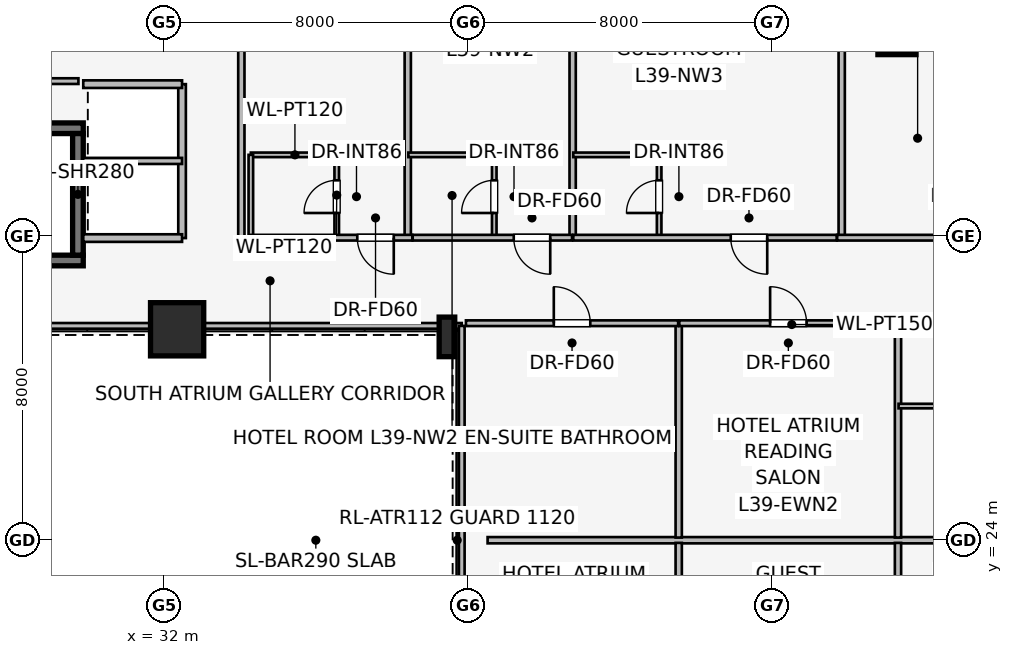
"""IFC4 building model, lengths in metres.
Left out: names, types, materials, properties, quantities, classifications, styles, units other than length and angle.
Written with IfcOpenShell. Run it as: python <this file> out.ifc"""

import sys

from ifc_helpers import new_model, si_unit, direction, frame, frame_2d, origin, origin_2d, place, context, subcontext, project, spatial, rectangle, i_section, extrude, element, fill, save


model = new_model("IFC4")
c1 = context("Model", 3, precision=1e-05, world=origin(), true_north=direction((0.0, 1.0)))
c2 = subcontext(c1, "Body", "Model", "MODEL_VIEW")
j1 = project(units=[si_unit("LENGTHUNIT", "METRE"), si_unit("PLANEANGLEUNIT", "RADIAN")], contexts=[c1])
p1 = place(None, origin())
s1 = spatial("IfcSite", under=j1, at=p1, CompositionType="ELEMENT")
p2 = place(p1, origin())
s2 = spatial("IfcBuilding", under=s1, at=p2, CompositionType="ELEMENT")
p3 = place(p2, frame((0.0, 0.0, 146.4)))
s3 = spatial("IfcBuildingStorey", under=s2, at=p3, CompositionType="ELEMENT", Elevation=146.4)
p4 = place(p3, frame((21.52, 31.36, 0.0), z_axis=(0.0, 0.0, 1.0), x_axis=(1.0, 0.0, 0.0)))
e1 = element("IfcWall", 1, at=p4, inside=s3, PredefinedType="SHEAR", context=c2, shape_type="SweptSolid", body=[
    extrude(rectangle(XDim=8.36, YDim=0.28, at=frame_2d((4.18, 0.0))), origin(), (0.0, 0.0, 1.0), 3.45),
])
p5 = place(p4, frame((0.45, 0.0, 0.0)))
e2 = element("IfcOpeningElement", 2, at=p5, cuts=e1, PredefinedType="OPENING", context=c2, shape_type="SweptSolid", body=[
    extrude(rectangle(XDim=1.05, YDim=2.0, at=frame_2d((0.525, 1.0))), frame((0.0, 0.15, 0.0), z_axis=(0.0, -1.0, 0.0), x_axis=(1.0, 0.0, 0.0)), (0.0, 0.0, 1.0), 0.3),
])
p6 = place(p3, frame((29.88, 34.84, 0.0), z_axis=(0.0, 0.0, 1.0), x_axis=(-1.0, 0.0, 0.0)))
e3 = element("IfcWall", 3, at=p6, inside=s3, PredefinedType="SHEAR", context=c2, shape_type="SweptSolid", body=[
    extrude(rectangle(XDim=8.36, YDim=0.28, at=frame_2d((4.18, 0.0))), origin(), (0.0, 0.0, 1.0), 3.45),
])
p7 = place(p3, frame((29.74, 31.5, 0.0), z_axis=(0.0, 0.0, 1.0), x_axis=(0.0, 1.0, 0.0)))
e4 = element("IfcWall", 4, at=p7, inside=s3, PredefinedType="SHEAR", context=c2, shape_type="SweptSolid", body=[
    extrude(rectangle(XDim=3.2, YDim=0.28, at=frame_2d((1.6, 0.0))), origin(), (0.0, 0.0, 1.0), 3.45),
])
p8 = place(p3, frame((32.35, 29.55, 0.0), z_axis=(0.0, 0.0, 1.0), x_axis=(1.0, 0.0, 0.0)))
e5 = element("IfcColumn", 5, at=p8, inside=s3, PredefinedType="COLUMN", context=c2, shape_type="SweptSolid", body=[
    extrude(rectangle(XDim=1.4, YDim=1.4, at=origin_2d()), origin(), (0.0, 0.0, 1.0), 3.45),
])
p9 = place(p3, frame((51.291, 37.277, 0.0), z_axis=(0.0, 0.0, 1.0), x_axis=(1.0, 0.0, 0.0)))
e6 = element("IfcColumn", 6, at=p9, inside=s3, PredefinedType="COLUMN", context=c2, shape_type="SweptSolid", body=[
    extrude(rectangle(XDim=1.0, YDim=1.0, at=origin_2d()), origin(), (0.0, 0.0, 1.0), 3.45),
])
p10 = place(p3, frame((39.45, 29.35, 0.0), z_axis=(0.0, 0.0, 1.0), x_axis=(1.0, 0.0, 0.0)))
e7 = element("IfcColumn", 7, at=p10, inside=s3, PredefinedType="COLUMN", context=c2, shape_type="SweptSolid", body=[
    extrude(i_section(OverallWidth=0.41, OverallDepth=1.041, WebThickness=0.031, FlangeThickness=0.056, at=origin_2d()), origin(), (0.0, 0.0, 1.0), 3.45),
])
p11 = place(p3, frame((38.231, 44.558, 0.0), z_axis=(0.0, 0.0, 1.0), x_axis=(0.888613612362, -0.458656568606, 0.0)))
e8 = element("IfcWall", 8, at=p11, inside=s3, PredefinedType="STANDARD", context=c2, shape_type="SweptSolid", body=[
    extrude(rectangle(XDim=18.681, YDim=0.34, at=frame_2d((9.34, 0.0))), origin(), (0.0, 0.0, 1.0), 3.19),
])
p12 = place(p11, frame((1.066, 0.0, 0.75)))
e9 = element("IfcOpeningElement", 9, at=p12, cuts=e8, PredefinedType="OPENING", context=c2, shape_type="SweptSolid", body=[
    extrude(rectangle(XDim=1.6, YDim=1.55, at=frame_2d((0.8, 0.775))), frame((0.0, 0.18, 0.0), z_axis=(0.0, -1.0, 0.0), x_axis=(1.0, 0.0, 0.0)), (0.0, 0.0, 1.0), 0.36),
])
p13 = place(p11, frame((6.28, 0.0, 0.75)))
e10 = element("IfcOpeningElement", 10, at=p13, cuts=e8, PredefinedType="OPENING", context=c2, shape_type="SweptSolid", body=[
    extrude(rectangle(XDim=2.1, YDim=1.5, at=frame_2d((1.05, 0.75))), frame((0.0, 0.18, 0.0), z_axis=(0.0, -1.0, 0.0), x_axis=(1.0, 0.0, 0.0)), (0.0, 0.0, 1.0), 0.36),
])
p14 = place(p11, frame((9.901, 0.0, 0.75)))
e11 = element("IfcOpeningElement", 11, at=p14, cuts=e8, PredefinedType="OPENING", context=c2, shape_type="SweptSolid", body=[
    extrude(rectangle(XDim=2.1, YDim=1.5, at=frame_2d((1.05, 0.75))), frame((0.0, 0.18, 0.0), z_axis=(0.0, -1.0, 0.0), x_axis=(1.0, 0.0, 0.0)), (0.0, 0.0, 1.0), 0.36),
])
p15 = place(p11, frame((16.058, 0.0, 0.75)))
e12 = element("IfcOpeningElement", 12, at=p15, cuts=e8, PredefinedType="OPENING", context=c2, shape_type="SweptSolid", body=[
    extrude(rectangle(XDim=1.6, YDim=1.55, at=frame_2d((0.8, 0.775))), frame((0.0, 0.18, 0.0), z_axis=(0.0, -1.0, 0.0), x_axis=(1.0, 0.0, 0.0)), (0.0, 0.0, 1.0), 0.36),
])
p16 = place(p3, frame((32.48, 31.95, 0.0), z_axis=(0.0, 0.0, 1.0), x_axis=(0.0, 1.0, 0.0)))
e13 = element("IfcWall", 13, at=p16, inside=s3, PredefinedType="PARTITIONING", context=c2, shape_type="SweptSolid", body=[
    extrude(rectangle(XDim=4.05, YDim=0.2, at=frame_2d((2.025, 0.0))), origin(), (0.0, 0.0, 1.0), 3.19),
])
p17 = place(p3, frame((29.88, 36.0, 0.0), z_axis=(0.0, 0.0, 1.0), x_axis=(1.0, 0.0, 0.0)))
e14 = element("IfcWall", 14, at=p17, inside=s3, PredefinedType="PARTITIONING", context=c2, shape_type="SweptSolid", body=[
    extrude(rectangle(XDim=2.6, YDim=0.2, at=frame_2d((1.3, 0.0))), origin(), (0.0, 0.0, 1.0), 2.582),
])
p18 = place(p3, frame((32.48, 31.95, 0.0), z_axis=(0.0, 0.0, 1.0), x_axis=(-1.0, 0.0, 0.0)))
e15 = element("IfcWall", 15, at=p18, inside=s3, PredefinedType="PARTITIONING", context=c2, shape_type="SweptSolid", body=[
    extrude(rectangle(XDim=2.6, YDim=0.2, at=frame_2d((1.3, 0.0))), origin(), (0.0, 0.0, 1.0), 3.19),
])
p19 = place(p3, frame((29.875, 33.98, 0.0), z_axis=(0.0, 0.0, 1.0), x_axis=(1.0, 0.0, 0.0)))
e16 = element("IfcWall", 16, at=p19, inside=s3, PredefinedType="PARTITIONING", context=c2, shape_type="SweptSolid", body=[
    extrude(rectangle(XDim=2.605, YDim=0.16, at=frame_2d((1.302, 0.0))), origin(), (0.0, 0.0, 1.0), 3.19),
])
p20 = place(p3, frame((39.84, 29.64, 0.0), z_axis=(0.0, 0.0, 1.0), x_axis=(-1.0, 0.0, 0.0)))
e17 = element("IfcWall", 17, at=p20, inside=s3, PredefinedType="PARTITIONING", context=c2, shape_type="SweptSolid", body=[
    extrude(rectangle(XDim=12.2, YDim=0.15, at=frame_2d((6.1, 0.0))), origin(), (0.0, 0.0, 1.0), 2.331),
])
p21 = place(p3, frame((39.84, 18.36, 0.0), z_axis=(0.0, 0.0, 1.0), x_axis=(0.0, 1.0, 0.0)))
e18 = element("IfcWall", 18, at=p21, inside=s3, PredefinedType="PARTITIONING", context=c2, shape_type="SweptSolid", body=[
    extrude(rectangle(XDim=11.28, YDim=0.15, at=frame_2d((5.64, 0.0))), origin(), (0.0, 0.0, 1.0), 3.19),
])
p22 = place(p3, frame((34.04, 31.96, 0.0), z_axis=(0.0, 0.0, 1.0), x_axis=(0.0, 1.0, 0.0)))
e19 = element("IfcWall", 19, at=p22, inside=s3, PredefinedType="PARTITIONING", context=c2, shape_type="SweptSolid", body=[
    extrude(rectangle(XDim=12.558, YDim=0.165, at=frame_2d((6.279, 0.0))), origin(), (0.0, 0.0, 1.0), 3.19),
])
p23 = place(p3, frame((38.419, 31.97, 0.0), z_axis=(0.0, 0.0, 1.0), x_axis=(0.0, 1.0, 0.0)))
e20 = element("IfcWall", 20, at=p23, inside=s3, PredefinedType="PARTITIONING", context=c2, shape_type="SweptSolid", body=[
    extrude(rectangle(XDim=12.356, YDim=0.165, at=frame_2d((6.178, 0.0))), origin(), (0.0, 0.0, 1.0), 3.19),
])
p24 = place(p3, frame((42.758, 31.97, 0.0), z_axis=(0.0, 0.0, 1.0), x_axis=(0.0, 1.0, 0.0)))
e21 = element("IfcWall", 21, at=p24, inside=s3, PredefinedType="PARTITIONING", context=c2, shape_type="SweptSolid", body=[
    extrude(rectangle(XDim=10.116, YDim=0.165, at=frame_2d((5.058, 0.0))), origin(), (0.0, 0.0, 1.0), 3.19),
])
p25 = place(p3, frame((49.838, 31.97, 0.0), z_axis=(0.0, 0.0, 1.0), x_axis=(0.0, 1.0, 0.0)))
e22 = element("IfcWall", 22, at=p25, inside=s3, PredefinedType="PARTITIONING", context=c2, shape_type="SweptSolid", body=[
    extrude(rectangle(XDim=6.462, YDim=0.165, at=frame_2d((3.231, 0.0))), origin(), (0.0, 0.0, 1.0), 3.19),
])
p26 = place(p3, frame((36.55, 31.96, 0.0), z_axis=(0.0, 0.0, 1.0), x_axis=(0.0, 1.0, 0.0)))
e23 = element("IfcWall", 23, at=p26, inside=s3, PredefinedType="PARTITIONING", context=c2, shape_type="SweptSolid", body=[
    extrude(rectangle(XDim=2.24, YDim=0.12, at=frame_2d((1.12, 0.0))), origin(), (0.0, 0.0, 1.0), 3.19),
])
p27 = place(p26, frame((0.65, 0.0, 0.0)))
e24 = element("IfcOpeningElement", 24, at=p27, cuts=e23, PredefinedType="OPENING", context=c2, shape_type="SweptSolid", body=[
    extrude(rectangle(XDim=0.86, YDim=2.0, at=frame_2d((0.43, 1.0))), frame((0.0, 0.07, 0.0), z_axis=(0.0, -1.0, 0.0), x_axis=(1.0, 0.0, 0.0)), (0.0, 0.0, 1.0), 0.14),
])
p28 = place(p3, frame((36.61, 34.14, 0.0), z_axis=(0.0, 0.0, 1.0), x_axis=(-1.0, 0.0, 0.0)))
e25 = element("IfcWall", 25, at=p28, inside=s3, PredefinedType="PARTITIONING", context=c2, shape_type="SweptSolid", body=[
    extrude(rectangle(XDim=2.32, YDim=0.12, at=frame_2d((1.16, 0.0))), origin(), (0.0, 0.0, 1.0), 3.19),
])
p29 = place(p3, frame((34.29, 34.14, 0.0), z_axis=(0.0, 0.0, 1.0), x_axis=(0.0, -1.0, 0.0)))
e26 = element("IfcWall", 26, at=p29, inside=s3, PredefinedType="PARTITIONING", context=c2, shape_type="SweptSolid", body=[
    extrude(rectangle(XDim=2.14, YDim=0.12, at=frame_2d((1.07, 0.0))), origin(), (0.0, 0.0, 1.0), 3.19),
])
p30 = place(p3, frame((38.539, 31.96, 0.0), z_axis=(0.0, 0.0, 1.0), x_axis=(-1.0, 0.0, 0.0)))
e27 = element("IfcWall", 27, at=p30, inside=s3, PredefinedType="PARTITIONING", context=c2, shape_type="SweptSolid", body=[
    extrude(rectangle(XDim=4.249, YDim=0.15, at=frame_2d((2.125, 0.0))), origin(), (0.0, 0.0, 1.0), 3.19),
])
p31 = place(p30, frame((0.488, 0.0, 0.0)))
e28 = element("IfcOpeningElement", 28, at=p31, cuts=e27, PredefinedType="OPENING", context=c2, shape_type="SweptSolid", body=[
    extrude(rectangle(XDim=0.96, YDim=2.0, at=frame_2d((0.48, 1.0))), frame((0.0, 0.085, 0.0), z_axis=(0.0, -1.0, 0.0), x_axis=(1.0, 0.0, 0.0)), (0.0, 0.0, 1.0), 0.17),
])
p32 = place(p3, frame((40.695, 31.96, 0.0), z_axis=(0.0, 0.0, 1.0), x_axis=(0.0, 1.0, 0.0)))
e29 = element("IfcWall", 29, at=p32, inside=s3, PredefinedType="PARTITIONING", context=c2, shape_type="SweptSolid", body=[
    extrude(rectangle(XDim=2.24, YDim=0.12, at=frame_2d((1.12, 0.0))), origin(), (0.0, 0.0, 1.0), 3.19),
])
p33 = place(p32, frame((0.65, 0.0, 0.0)))
e30 = element("IfcOpeningElement", 30, at=p33, cuts=e29, PredefinedType="OPENING", context=c2, shape_type="SweptSolid", body=[
    extrude(rectangle(XDim=0.86, YDim=2.0, at=frame_2d((0.43, 1.0))), frame((0.0, 0.07, 0.0), z_axis=(0.0, -1.0, 0.0), x_axis=(1.0, 0.0, 0.0)), (0.0, 0.0, 1.0), 0.14),
])
p34 = place(p3, frame((40.755, 34.14, 0.0), z_axis=(0.0, 0.0, 1.0), x_axis=(-1.0, 0.0, 0.0)))
e31 = element("IfcWall", 31, at=p34, inside=s3, PredefinedType="PARTITIONING", context=c2, shape_type="SweptSolid", body=[
    extrude(rectangle(XDim=2.32, YDim=0.12, at=frame_2d((1.16, 0.0))), origin(), (0.0, 0.0, 1.0), 3.19),
])
p35 = place(p3, frame((42.742, 31.96, 0.0), z_axis=(0.0, 0.0, 1.0), x_axis=(-1.0, 0.0, 0.0)))
e32 = element("IfcWall", 32, at=p35, inside=s3, PredefinedType="PARTITIONING", context=c2, shape_type="SweptSolid", body=[
    extrude(rectangle(XDim=4.193, YDim=0.15, at=frame_2d((2.096, 0.0))), origin(), (0.0, 0.0, 1.0), 3.19),
])
p36 = place(p35, frame((0.574, 0.0, 0.0)))
e33 = element("IfcOpeningElement", 33, at=p36, cuts=e32, PredefinedType="OPENING", context=c2, shape_type="SweptSolid", body=[
    extrude(rectangle(XDim=0.96, YDim=2.0, at=frame_2d((0.48, 1.0))), frame((0.0, 0.085, 0.0), z_axis=(0.0, -1.0, 0.0), x_axis=(1.0, 0.0, 0.0)), (0.0, 0.0, 1.0), 0.17),
])
p37 = place(p3, frame((45.034, 31.96, 0.0), z_axis=(0.0, 0.0, 1.0), x_axis=(0.0, 1.0, 0.0)))
e34 = element("IfcWall", 34, at=p37, inside=s3, PredefinedType="PARTITIONING", context=c2, shape_type="SweptSolid", body=[
    extrude(rectangle(XDim=2.24, YDim=0.12, at=frame_2d((1.12, 0.0))), origin(), (0.0, 0.0, 1.0), 3.19),
])
p38 = place(p37, frame((0.65, 0.0, 0.0)))
e35 = element("IfcOpeningElement", 35, at=p38, cuts=e34, PredefinedType="OPENING", context=c2, shape_type="SweptSolid", body=[
    extrude(rectangle(XDim=0.86, YDim=2.0, at=frame_2d((0.43, 1.0))), frame((0.0, 0.07, 0.0), z_axis=(0.0, -1.0, 0.0), x_axis=(1.0, 0.0, 0.0)), (0.0, 0.0, 1.0), 0.14),
])
p39 = place(p3, frame((45.094, 34.14, 0.0), z_axis=(0.0, 0.0, 1.0), x_axis=(-1.0, 0.0, 0.0)))
e36 = element("IfcWall", 36, at=p39, inside=s3, PredefinedType="PARTITIONING", context=c2, shape_type="SweptSolid", body=[
    extrude(rectangle(XDim=2.32, YDim=0.12, at=frame_2d((1.16, 0.0))), origin(), (0.0, 0.0, 1.0), 3.19),
])
p40 = place(p3, frame((49.708, 31.96, 0.0), z_axis=(0.0, 0.0, 1.0), x_axis=(-1.0, 0.0, 0.0)))
e37 = element("IfcWall", 37, at=p40, inside=s3, PredefinedType="PARTITIONING", context=c2, shape_type="SweptSolid", body=[
    extrude(rectangle(XDim=6.934, YDim=0.15, at=frame_2d((3.467, 0.0))), origin(), (0.0, 0.0, 1.0), 3.19),
])
p41 = place(p40, frame((1.83, 0.0, 0.0)))
e38 = element("IfcOpeningElement", 38, at=p41, cuts=e37, PredefinedType="OPENING", context=c2, shape_type="SweptSolid", body=[
    extrude(rectangle(XDim=0.96, YDim=2.0, at=frame_2d((0.48, 1.0))), frame((0.0, 0.085, 0.0), z_axis=(0.0, -1.0, 0.0), x_axis=(1.0, 0.0, 0.0)), (0.0, 0.0, 1.0), 0.17),
])
p42 = place(p3, frame((56.987, 31.96, 0.0), z_axis=(0.0, 0.0, 1.0), x_axis=(-1.0, 0.0, 0.0)))
e39 = element("IfcWall", 39, at=p42, inside=s3, PredefinedType="PARTITIONING", context=c2, shape_type="SweptSolid", body=[
    extrude(rectangle(XDim=7.269, YDim=0.15, at=frame_2d((3.635, 0.0))), origin(), (0.0, 0.0, 1.0), 3.19),
])
p43 = place(p42, frame((3.212, 0.0, 0.0)))
e40 = element("IfcOpeningElement", 40, at=p43, cuts=e39, PredefinedType="OPENING", context=c2, shape_type="SweptSolid", body=[
    extrude(rectangle(XDim=0.96, YDim=2.0, at=frame_2d((0.48, 1.0))), frame((0.0, 0.085, 0.0), z_axis=(0.0, -1.0, 0.0), x_axis=(1.0, 0.0, 0.0)), (0.0, 0.0, 1.0), 0.17),
])
p44 = place(p3, frame((40.52, 24.0, 0.0), z_axis=(0.0, 0.0, 1.0), x_axis=(1.0, 0.0, 0.0)))
e41 = element("IfcWall", 41, at=p44, inside=s3, PredefinedType="PARTITIONING", context=c2, shape_type="SweptSolid", body=[
    extrude(rectangle(XDim=16.408, YDim=0.165, at=frame_2d((8.204, 0.0))), origin(), (0.0, 0.0, 1.0), 3.19),
])
for number, where, z_axis, x_axis in (
    (42, (45.549, 24.07, 0.0), (0.0, 0.0, 1.0), (0.0, 1.0, 0.0)),
    (43, (51.319, 24.07, 0.0), (0.0, 0.0, 1.0), (0.0, 1.0, 0.0)),
):
    element("IfcWall", number, at=place(p3, frame(where, z_axis=z_axis, x_axis=x_axis)), inside=s3, PredefinedType="PARTITIONING", context=c2, shape_type="SweptSolid", body=[
        extrude(rectangle(XDim=5.64, YDim=0.165, at=frame_2d((2.82, 0.0))), origin(), (0.0, 0.0, 1.0), 3.19),
    ])
p45 = place(p3, frame((39.95, 29.71, 0.0), z_axis=(0.0, 0.0, 1.0), x_axis=(1.0, 0.0, 0.0)))
e44 = element("IfcWall", 44, at=p45, inside=s3, PredefinedType="PARTITIONING", context=c2, shape_type="SweptSolid", body=[
    extrude(rectangle(XDim=5.584, YDim=0.15, at=frame_2d((2.792, 0.0))), origin(), (0.0, 0.0, 1.0), 3.19),
])
p46 = place(p45, frame((2.312, 0.0, 0.0)))
e45 = element("IfcOpeningElement", 45, at=p46, cuts=e44, PredefinedType="OPENING", context=c2, shape_type="SweptSolid", body=[
    extrude(rectangle(XDim=0.96, YDim=2.0, at=frame_2d((0.48, 1.0))), frame((0.0, 0.085, 0.0), z_axis=(0.0, -1.0, 0.0), x_axis=(1.0, 0.0, 0.0)), (0.0, 0.0, 1.0), 0.17),
])
p47 = place(p3, frame((45.564, 29.71, 0.0), z_axis=(0.0, 0.0, 1.0), x_axis=(1.0, 0.0, 0.0)))
e46 = element("IfcWall", 46, at=p47, inside=s3, PredefinedType="PARTITIONING", context=c2, shape_type="SweptSolid", body=[
    extrude(rectangle(XDim=5.74, YDim=0.15, at=frame_2d((2.87, 0.0))), origin(), (0.0, 0.0, 1.0), 3.19),
])
p48 = place(p47, frame((2.39, 0.0, 0.0)))
e47 = element("IfcOpeningElement", 47, at=p48, cuts=e46, PredefinedType="OPENING", context=c2, shape_type="SweptSolid", body=[
    extrude(rectangle(XDim=0.96, YDim=2.0, at=frame_2d((0.48, 1.0))), frame((0.0, 0.085, 0.0), z_axis=(0.0, -1.0, 0.0), x_axis=(1.0, 0.0, 0.0)), (0.0, 0.0, 1.0), 0.17),
])
p49 = place(p3, frame((51.334, 27.53, 0.0), z_axis=(0.0, 0.0, 1.0), x_axis=(1.0, 0.0, 0.0)))
e48 = element("IfcWall", 48, at=p49, inside=s3, PredefinedType="PARTITIONING", context=c2, shape_type="SweptSolid", body=[
    extrude(rectangle(XDim=2.32, YDim=0.12, at=frame_2d((1.16, 0.0))), origin(), (0.0, 0.0, 1.0), 3.19),
])
p50 = place(p3, frame((51.334, 29.71, 0.0), z_axis=(0.0, 0.0, 1.0), x_axis=(1.0, 0.0, 0.0)))
e49 = element("IfcWall", 49, at=p50, inside=s3, PredefinedType="PARTITIONING", context=c2, shape_type="SweptSolid", body=[
    extrude(rectangle(XDim=5.874, YDim=0.15, at=frame_2d((2.937, 0.0))), origin(), (0.0, 0.0, 1.0), 3.19),
])
p51 = place(p50, frame((3.572, 0.0, 0.0)))
e50 = element("IfcOpeningElement", 50, at=p51, cuts=e49, PredefinedType="OPENING", context=c2, shape_type="SweptSolid", body=[
    extrude(rectangle(XDim=0.96, YDim=2.0, at=frame_2d((0.48, 1.0))), frame((0.0, 0.085, 0.0), z_axis=(0.0, -1.0, 0.0), x_axis=(1.0, 0.0, 0.0)), (0.0, 0.0, 1.0), 0.17),
])
for number, where, z_axis, x_axis in (
    (51, (45.549, 18.29, 0.0), (0.0, 0.0, 1.0), (0.0, 1.0, 0.0)),
    (52, (51.319, 18.29, 0.0), (0.0, 0.0, 1.0), (0.0, 1.0, 0.0)),
):
    element("IfcWall", number, at=place(p3, frame(where, z_axis=z_axis, x_axis=x_axis)), inside=s3, PredefinedType="PARTITIONING", context=c2, shape_type="SweptSolid", body=[
        extrude(rectangle(XDim=5.64, YDim=0.165, at=frame_2d((2.82, 0.0))), origin(), (0.0, 0.0, 1.0), 3.19),
    ])
p52 = place(p3, frame((31.972, 43.372, 0.0), z_axis=(0.0, 0.0, 1.0), x_axis=(-0.888588109751, -0.458705974683, 0.0)))
e53 = element("IfcWall", 53, at=p52, inside=s3, PredefinedType="PARTITIONING", context=c2, shape_type="SweptSolid", body=[
    extrude(rectangle(XDim=14.399, YDim=0.165, at=frame_2d((7.2, 0.0))), origin(), (0.0, 0.0, 1.0), 2.562),
])
p53 = place(p52, frame((10.049, 0.0, 0.0)))
e54 = element("IfcOpeningElement", 54, at=p53, cuts=e53, PredefinedType="OPENING", context=c2, shape_type="SweptSolid", body=[
    extrude(rectangle(XDim=0.96, YDim=2.0, at=frame_2d((0.48, 1.0))), frame((0.0, 0.093, 0.0), z_axis=(0.0, -1.0, 0.0), x_axis=(1.0, 0.0, 0.0)), (0.0, 0.0, 1.0), 0.185),
])
p54 = place(p3, frame((29.753, 36.08, 0.0), z_axis=(0.0, 0.0, 1.0), x_axis=(-1.0, 0.0, 0.0)))
e55 = element("IfcWall", 55, at=p54, inside=s3, PredefinedType="PARTITIONING", context=c2, shape_type="SweptSolid", body=[
    extrude(rectangle(XDim=7.353, YDim=0.15, at=frame_2d((3.677, 0.0))), origin(), (0.0, 0.0, 1.0), 2.657),
])
p55 = place(p27, origin())
e56 = element("IfcDoor", 56, at=p55, inside=s3, OperationType="SINGLE_SWING_LEFT", PredefinedType="DOOR", context=c2, shape_type="SweptSolid", body=[
    extrude(rectangle(XDim=0.86, YDim=2.0, at=frame_2d((0.43, 1.0))), frame((0.0, 0.025, 0.0), z_axis=(0.0, -1.0, 0.0), x_axis=(1.0, 0.0, 0.0)), (0.0, 0.0, 1.0), 0.05),
])
fill(e24, e56)
p56 = place(p31, origin())
e57 = element("IfcDoor", 57, at=p56, inside=s3, OperationType="SINGLE_SWING_LEFT", PredefinedType="DOOR", context=c2, shape_type="SweptSolid", body=[
    extrude(rectangle(XDim=0.96, YDim=2.0, at=frame_2d((0.48, 1.0))), frame((0.0, 0.025, 0.0), z_axis=(0.0, -1.0, 0.0), x_axis=(1.0, 0.0, 0.0)), (0.0, 0.0, 1.0), 0.05),
])
fill(e28, e57)
p57 = place(p33, origin())
e58 = element("IfcDoor", 58, at=p57, inside=s3, OperationType="SINGLE_SWING_LEFT", PredefinedType="DOOR", context=c2, shape_type="SweptSolid", body=[
    extrude(rectangle(XDim=0.86, YDim=2.0, at=frame_2d((0.43, 1.0))), frame((0.0, 0.025, 0.0), z_axis=(0.0, -1.0, 0.0), x_axis=(1.0, 0.0, 0.0)), (0.0, 0.0, 1.0), 0.05),
])
fill(e30, e58)
p58 = place(p36, origin())
e59 = element("IfcDoor", 59, at=p58, inside=s3, OperationType="SINGLE_SWING_LEFT", PredefinedType="DOOR", context=c2, shape_type="SweptSolid", body=[
    extrude(rectangle(XDim=0.96, YDim=2.0, at=frame_2d((0.48, 1.0))), frame((0.0, 0.025, 0.0), z_axis=(0.0, -1.0, 0.0), x_axis=(1.0, 0.0, 0.0)), (0.0, 0.0, 1.0), 0.05),
])
fill(e33, e59)
p59 = place(p38, origin())
e60 = element("IfcDoor", 60, at=p59, inside=s3, OperationType="SINGLE_SWING_LEFT", PredefinedType="DOOR", context=c2, shape_type="SweptSolid", body=[
    extrude(rectangle(XDim=0.86, YDim=2.0, at=frame_2d((0.43, 1.0))), frame((0.0, 0.025, 0.0), z_axis=(0.0, -1.0, 0.0), x_axis=(1.0, 0.0, 0.0)), (0.0, 0.0, 1.0), 0.05),
])
fill(e35, e60)
p60 = place(p41, origin())
e61 = element("IfcDoor", 61, at=p60, inside=s3, OperationType="SINGLE_SWING_LEFT", PredefinedType="DOOR", context=c2, shape_type="SweptSolid", body=[
    extrude(rectangle(XDim=0.96, YDim=2.0, at=frame_2d((0.48, 1.0))), frame((0.0, 0.025, 0.0), z_axis=(0.0, -1.0, 0.0), x_axis=(1.0, 0.0, 0.0)), (0.0, 0.0, 1.0), 0.05),
])
fill(e38, e61)
p61 = place(p46, origin())
e62 = element("IfcDoor", 62, at=p61, inside=s3, OperationType="SINGLE_SWING_LEFT", PredefinedType="DOOR", context=c2, shape_type="SweptSolid", body=[
    extrude(rectangle(XDim=0.96, YDim=2.0, at=frame_2d((0.48, 1.0))), frame((0.0, 0.025, 0.0), z_axis=(0.0, -1.0, 0.0), x_axis=(1.0, 0.0, 0.0)), (0.0, 0.0, 1.0), 0.05),
])
fill(e45, e62)
p62 = place(p48, origin())
e63 = element("IfcDoor", 63, at=p62, inside=s3, OperationType="SINGLE_SWING_LEFT", PredefinedType="DOOR", context=c2, shape_type="SweptSolid", body=[
    extrude(rectangle(XDim=0.96, YDim=2.0, at=frame_2d((0.48, 1.0))), frame((0.0, 0.025, 0.0), z_axis=(0.0, -1.0, 0.0), x_axis=(1.0, 0.0, 0.0)), (0.0, 0.0, 1.0), 0.05),
])
fill(e47, e63)
save(model, sys.argv[1])
